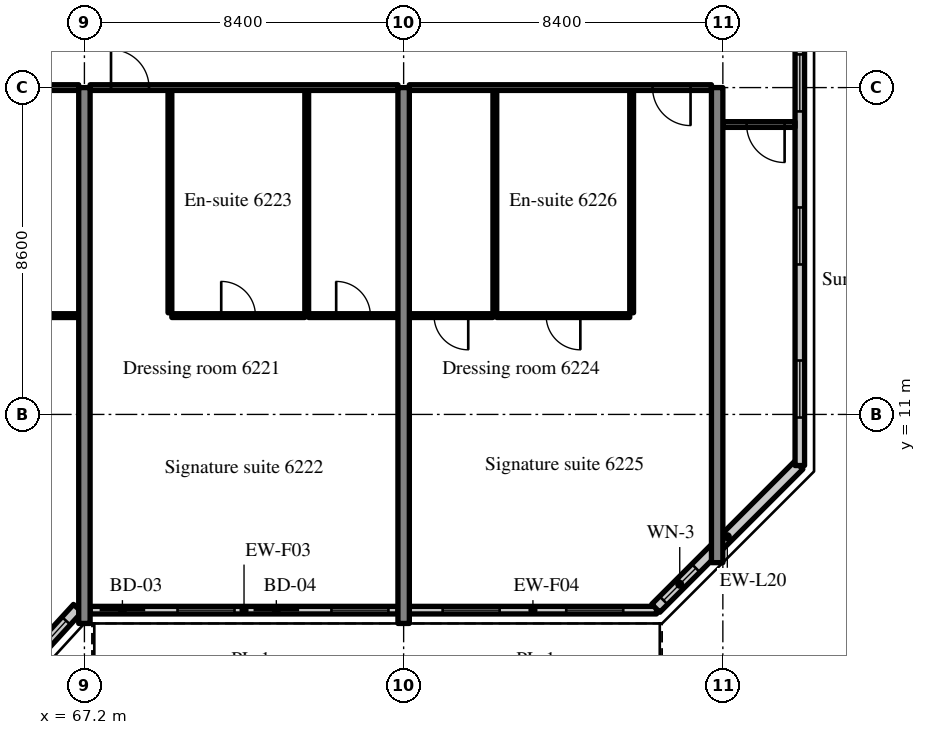
"""IFC4 building model, lengths in metres.
Left out: names, types, materials, properties, quantities, classifications, styles, units other than length and angle.
Written with IfcOpenShell. Run it as: python <this file> out.ifc"""

import sys

from ifc_helpers import new_model, si_unit, direction, frame, frame_2d, origin, place, context, subcontext, project, spatial, rectangle, extrude, source, transform, mapped, element, fill, save


model = new_model("IFC4")
c1 = context("Model", 3, precision=1e-05, world=origin(), true_north=direction((0.0, 1.0)))
c2 = subcontext(c1, "Body", "Model", "MODEL_VIEW")
j1 = project(units=[si_unit("LENGTHUNIT", "METRE"), si_unit("PLANEANGLEUNIT", "RADIAN")], contexts=[c1])
p1 = place(None, origin())
s1 = spatial("IfcSite", under=j1, at=p1, CompositionType="ELEMENT")
p2 = place(p1, origin())
s2 = spatial("IfcBuilding", under=s1, at=p2, CompositionType="ELEMENT")
p3 = place(p2, frame((0.0, 0.0, 256.9)))
s3 = spatial("IfcBuildingStorey", under=s2, at=p3, CompositionType="ELEMENT", Elevation=256.9)
m1 = source(origin(), c2, "Body", "SweptSolid", [
    extrude(rectangle(XDim=14.1, YDim=0.3, at=frame_2d((7.05, 0.0))), origin(), (0.0, 0.0, 1.0), 3.62),
])
for number, where, z_axis, x_axis in (
    (1, (67.2, 5.5, 0.0), (0.0, 0.0, 1.0), (0.0, 1.0, 0.0)),
    (2, (75.6, 5.5, 0.0), (0.0, 0.0, 1.0), (0.0, 1.0, 0.0)),
):
    element("IfcWall", number, at=place(p3, frame(where, z_axis=z_axis, x_axis=x_axis)), inside=s3, PredefinedType="SHEAR", context=c2, shape_type="MappedRepresentation", body=[
        mapped(m1, transform((0.0, 0.0, 0.0), scale=1.0)),
    ])
m2 = source(origin(), c2, "Body", "SweptSolid", [
    extrude(rectangle(XDim=12.5, YDim=0.3, at=frame_2d((6.25, 0.0))), origin(), (0.0, 0.0, 1.0), 3.62),
])
p4 = place(p3, frame((83.85, 7.1, 0.0), z_axis=(0.0, 0.0, 1.0), x_axis=(0.0, 1.0, 0.0)))
e3 = element("IfcWall", 3, at=p4, inside=s3, PredefinedType="SHEAR", context=c2, shape_type="MappedRepresentation", body=[
    mapped(m2, transform((0.0, 0.0, 0.0), scale=1.0)),
])
m3 = source(origin(), c2, "Body", "SweptSolid", [
    extrude(rectangle(XDim=2.398, YDim=0.3, at=frame_2d((1.199, 0.0))), origin(), (0.0, 0.0, 1.0), 3.62),
])
p5 = place(p3, frame((65.404, 4.131, 0.0), z_axis=(0.0, 0.0, 1.0), x_axis=(0.675374189419, 0.737475222815, 0.0)))
e4 = element("IfcWall", 4, at=p5, inside=s3, PredefinedType="SOLIDWALL", context=c2, shape_type="MappedRepresentation", body=[
    mapped(m3, transform((0.0, 0.0, 0.0), scale=1.0)),
])
m4 = source(origin(), c2, "Body", "SweptSolid", [
    extrude(rectangle(XDim=1.5, YDim=2.0, at=frame_2d((0.75, 1.0))), frame((0.0, 0.16, 0.0), z_axis=(0.0, -1.0, 0.0), x_axis=(1.0, 0.0, 0.0)), (0.0, 0.0, 1.0), 0.32),
])
p6 = place(p5, frame((0.449, 0.0, 0.9)))
e5 = element("IfcOpeningElement", 5, at=p6, cuts=e4, PredefinedType="OPENING", context=c2, shape_type="MappedRepresentation", body=[
    mapped(m4, transform((0.0, 0.0, 0.0), scale=1.0)),
])
m5 = source(origin(), c2, "Body", "SweptSolid", [
    extrude(rectangle(XDim=8.1, YDim=0.2, at=frame_2d((4.05, 0.0))), origin(), (0.0, 0.0, 1.0), 3.02),
])
p7 = place(p3, frame((67.35, 5.85, 0.0), z_axis=(0.0, 0.0, 1.0), x_axis=(1.0, 0.0, 0.0)))
e6 = element("IfcWall", 6, at=p7, inside=s3, PredefinedType="SOLIDWALL", context=c2, shape_type="MappedRepresentation", body=[
    mapped(m5, transform((0.0, 0.0, 0.0), scale=1.0)),
])
m6 = source(origin(), c2, "Body", "SweptSolid", [
    extrude(rectangle(XDim=1.2, YDim=2.4, at=frame_2d((0.6, 1.2))), frame((0.0, 0.11, 0.0), z_axis=(0.0, -1.0, 0.0), x_axis=(1.0, 0.0, 0.0)), (0.0, 0.0, 1.0), 0.22),
])
p8 = place(p7, frame((0.25, 0.0, 0.0)))
e7 = element("IfcOpeningElement", 7, at=p8, cuts=e6, PredefinedType="OPENING", context=c2, shape_type="MappedRepresentation", body=[
    mapped(m6, transform((0.0, 0.0, 0.0), scale=1.0)),
])
m7 = source(origin(), c2, "Body", "SweptSolid", [
    extrude(rectangle(XDim=1.5, YDim=1.5, at=frame_2d((0.75, 0.75))), frame((0.0, 0.11, 0.0), z_axis=(0.0, -1.0, 0.0), x_axis=(1.0, 0.0, 0.0)), (0.0, 0.0, 1.0), 0.22),
])
p9 = place(p7, frame((2.3, 0.0, 0.9)))
e8 = element("IfcOpeningElement", 8, at=p9, cuts=e6, PredefinedType="OPENING", context=c2, shape_type="MappedRepresentation", body=[
    mapped(m7, transform((0.0, 0.0, 0.0), scale=1.0)),
])
p10 = place(p7, frame((4.3, 0.0, 0.0)))
e9 = element("IfcOpeningElement", 9, at=p10, cuts=e6, PredefinedType="OPENING", context=c2, shape_type="MappedRepresentation", body=[
    mapped(m6, transform((0.0, 0.0, 0.0), scale=1.0)),
])
p11 = place(p7, frame((6.35, 0.0, 0.9)))
e10 = element("IfcOpeningElement", 10, at=p11, cuts=e6, PredefinedType="OPENING", context=c2, shape_type="MappedRepresentation", body=[
    mapped(m7, transform((0.0, 0.0, 0.0), scale=1.0)),
])
m8 = source(origin(), c2, "Body", "SweptSolid", [
    extrude(rectangle(XDim=6.505, YDim=0.2, at=frame_2d((3.252, 0.0))), origin(), (0.0, 0.0, 1.0), 3.02),
])
p12 = place(p3, frame((75.75, 5.85, 0.0), z_axis=(0.0, 0.0, 1.0), x_axis=(1.0, 0.0, 0.0)))
e11 = element("IfcWall", 11, at=p12, inside=s3, PredefinedType="SOLIDWALL", context=c2, shape_type="MappedRepresentation", body=[
    mapped(m8, transform((0.0, 0.0, 0.0), scale=1.0)),
])
p13 = place(p12, frame((0.876, 0.0, 0.9)))
e12 = element("IfcOpeningElement", 12, at=p13, cuts=e11, PredefinedType="OPENING", context=c2, shape_type="MappedRepresentation", body=[
    mapped(m7, transform((0.0, 0.0, 0.0), scale=1.0)),
])
p14 = place(p12, frame((4.129, 0.0, 0.9)))
e13 = element("IfcOpeningElement", 13, at=p14, cuts=e11, PredefinedType="OPENING", context=c2, shape_type="MappedRepresentation", body=[
    mapped(m7, transform((0.0, 0.0, 0.0), scale=1.0)),
])
m9 = source(origin(), c2, "Body", "SweptSolid", [
    extrude(rectangle(XDim=5.326, YDim=0.3, at=frame_2d((2.663, 0.0))), origin(), (0.0, 0.0, 1.0), 3.62),
])
p15 = place(p3, frame((82.234, 5.9, 0.0), z_axis=(0.0, 0.0, 1.0), x_axis=(0.707083859269, 0.707129702361, 0.0)))
e14 = element("IfcWall", 14, at=p15, inside=s3, PredefinedType="SOLIDWALL", context=c2, shape_type="MappedRepresentation", body=[
    mapped(m9, transform((0.0, 0.0, 0.0), scale=1.0)),
])
m10 = source(origin(), c2, "Body", "SweptSolid", [
    extrude(rectangle(XDim=1.2, YDim=1.5, at=frame_2d((0.6, 0.75))), frame((0.0, 0.16, 0.0), z_axis=(0.0, -1.0, 0.0), x_axis=(1.0, 0.0, 0.0)), (0.0, 0.0, 1.0), 0.32),
])
p16 = place(p15, frame((0.292, 0.0, 0.9)))
e15 = element("IfcOpeningElement", 15, at=p16, cuts=e14, PredefinedType="OPENING", context=c2, shape_type="MappedRepresentation", body=[
    mapped(m10, transform((0.0, 0.0, 0.0), scale=1.0)),
])
m11 = source(origin(), c2, "Body", "SweptSolid", [
    extrude(rectangle(XDim=28.189, YDim=0.25, at=frame_2d((14.095, 0.0))), origin(), (0.0, 0.0, 1.0), 3.62),
])
p17 = place(p3, frame((86.025, 9.655, 0.0), z_axis=(0.0, 0.0, 1.0), x_axis=(0.0, 1.0, 0.0)))
e16 = element("IfcWall", 16, at=p17, inside=s3, PredefinedType="SOLIDWALL", context=c2, shape_type="MappedRepresentation", body=[
    mapped(m11, transform((0.0, 0.0, 0.0), scale=1.0)),
])
m12 = source(origin(), c2, "Body", "SweptSolid", [
    extrude(rectangle(XDim=1.5, YDim=1.5, at=frame_2d((0.75, 0.75))), frame((0.0, 0.135, 0.0), z_axis=(0.0, -1.0, 0.0), x_axis=(1.0, 0.0, 0.0)), (0.0, 0.0, 1.0), 0.27),
])
p18 = place(p17, frame((1.263, 0.0, 0.9)))
e17 = element("IfcOpeningElement", 17, at=p18, cuts=e16, PredefinedType="OPENING", context=c2, shape_type="MappedRepresentation", body=[
    mapped(m12, transform((0.0, 0.0, 0.0), scale=1.0)),
])
p19 = place(p17, frame((5.291, 0.0, 0.9)))
e18 = element("IfcOpeningElement", 18, at=p19, cuts=e16, PredefinedType="OPENING", context=c2, shape_type="MappedRepresentation", body=[
    mapped(m12, transform((0.0, 0.0, 0.0), scale=1.0)),
])
p20 = place(p17, frame((9.318, 0.0, 0.9)))
e19 = element("IfcOpeningElement", 19, at=p20, cuts=e16, PredefinedType="OPENING", context=c2, shape_type="MappedRepresentation", body=[
    mapped(m12, transform((0.0, 0.0, 0.0), scale=1.0)),
])
p21 = place(p17, frame((13.345, 0.0, 0.9)))
e20 = element("IfcOpeningElement", 20, at=p21, cuts=e16, PredefinedType="OPENING", context=c2, shape_type="MappedRepresentation", body=[
    mapped(m12, transform((0.0, 0.0, 0.0), scale=1.0)),
])
p22 = place(p17, frame((17.372, 0.0, 0.9)))
e21 = element("IfcOpeningElement", 21, at=p22, cuts=e16, PredefinedType="OPENING", context=c2, shape_type="MappedRepresentation", body=[
    mapped(m12, transform((0.0, 0.0, 0.0), scale=1.0)),
])
p23 = place(p17, frame((21.399, 0.0, 0.9)))
e22 = element("IfcOpeningElement", 22, at=p23, cuts=e16, PredefinedType="OPENING", context=c2, shape_type="MappedRepresentation", body=[
    mapped(m12, transform((0.0, 0.0, 0.0), scale=1.0)),
])
p24 = place(p17, frame((25.426, 0.0, 0.9)))
e23 = element("IfcOpeningElement", 23, at=p24, cuts=e16, PredefinedType="OPENING", context=c2, shape_type="MappedRepresentation", body=[
    mapped(m12, transform((0.0, 0.0, 0.0), scale=1.0)),
])
m13 = source(origin(), c2, "Body", "SweptSolid", [
    extrude(rectangle(XDim=2.35, YDim=0.1, at=frame_2d((1.175, 0.0))), origin(), (0.0, 0.0, 1.0), 3.62),
])
p25 = place(p3, frame((64.7, 13.6, 0.0), z_axis=(0.0, 0.0, 1.0), x_axis=(1.0, 0.0, 0.0)))
e24 = element("IfcWall", 24, at=p25, inside=s3, PredefinedType="PARTITIONING", context=c2, shape_type="MappedRepresentation", body=[
    mapped(m13, transform((0.0, 0.0, 0.0), scale=1.0)),
])
m14 = source(origin(), c2, "Body", "SweptSolid", [
    extrude(rectangle(XDim=0.9, YDim=2.1, at=frame_2d((0.45, 1.05))), frame((0.0, 0.06, 0.0), z_axis=(0.0, -1.0, 0.0), x_axis=(1.0, 0.0, 0.0)), (0.0, 0.0, 1.0), 0.12),
])
p26 = place(p25, frame((0.725, 0.0, 0.0)))
e25 = element("IfcOpeningElement", 25, at=p26, cuts=e24, PredefinedType="OPENING", context=c2, shape_type="MappedRepresentation", body=[
    mapped(m14, transform((0.0, 0.0, 0.0), scale=1.0)),
])
m15 = source(origin(), c2, "Body", "SweptSolid", [
    extrude(rectangle(XDim=8.1, YDim=0.15, at=frame_2d((4.05, 0.0))), origin(), (0.0, 0.0, 1.0), 2.92),
])
p27 = place(p3, frame((58.95, 19.6, 0.0), z_axis=(0.0, 0.0, 1.0), x_axis=(1.0, 0.0, 0.0)))
e26 = element("IfcWall", 26, at=p27, inside=s3, PredefinedType="PARTITIONING", context=c2, shape_type="MappedRepresentation", body=[
    mapped(m15, transform((0.0, 0.0, 0.0), scale=1.0)),
])
m16 = source(origin(), c2, "Body", "SweptSolid", [
    extrude(rectangle(XDim=1.0, YDim=2.1, at=frame_2d((0.5, 1.05))), frame((0.0, 0.085, 0.0), z_axis=(0.0, -1.0, 0.0), x_axis=(1.0, 0.0, 0.0)), (0.0, 0.0, 1.0), 0.17),
])
p28 = place(p27, frame((0.55, 0.0, 0.0)))
e27 = element("IfcOpeningElement", 27, at=p28, cuts=e26, PredefinedType="OPENING", context=c2, shape_type="MappedRepresentation", body=[
    mapped(m16, transform((0.0, 0.0, 0.0), scale=1.0)),
])
m17 = source(origin(), c2, "Body", "SweptSolid", [
    extrude(rectangle(XDim=5.85, YDim=0.1, at=frame_2d((2.925, 0.0))), origin(), (0.0, 0.0, 1.0), 3.62),
])
for number, where, z_axis, x_axis in (
    (28, (69.45, 13.675, 0.0), (0.0, 0.0, 1.0), (0.0, 1.0, 0.0)),
    (29, (73.05, 13.675, 0.0), (0.0, 0.0, 1.0), (0.0, 1.0, 0.0)),
):
    element("IfcWall", number, at=place(p3, frame(where, z_axis=z_axis, x_axis=x_axis)), inside=s3, PredefinedType="PARTITIONING", context=c2, shape_type="MappedRepresentation", body=[
        mapped(m17, transform((0.0, 0.0, 0.0), scale=1.0)),
    ])
m18 = source(origin(), c2, "Body", "SweptSolid", [
    extrude(rectangle(XDim=3.5, YDim=0.1, at=frame_2d((1.75, 0.0))), origin(), (0.0, 0.0, 1.0), 3.62),
])
p29 = place(p3, frame((69.5, 13.6, 0.0), z_axis=(0.0, 0.0, 1.0), x_axis=(1.0, 0.0, 0.0)))
e30 = element("IfcWall", 30, at=p29, inside=s3, PredefinedType="PARTITIONING", context=c2, shape_type="MappedRepresentation", body=[
    mapped(m18, transform((0.0, 0.0, 0.0), scale=1.0)),
])
p30 = place(p29, frame((1.3, 0.0, 0.0)))
e31 = element("IfcOpeningElement", 31, at=p30, cuts=e30, PredefinedType="OPENING", context=c2, shape_type="MappedRepresentation", body=[
    mapped(m14, transform((0.0, 0.0, 0.0), scale=1.0)),
])
m19 = source(origin(), c2, "Body", "SweptSolid", [
    extrude(rectangle(XDim=2.35, YDim=0.1, at=frame_2d((1.175, 0.0))), origin(), (0.0, 0.0, 1.0), 3.62),
])
p31 = place(p3, frame((73.1, 13.6, 0.0), z_axis=(0.0, 0.0, 1.0), x_axis=(1.0, 0.0, 0.0)))
e32 = element("IfcWall", 32, at=p31, inside=s3, PredefinedType="PARTITIONING", context=c2, shape_type="MappedRepresentation", body=[
    mapped(m19, transform((0.0, 0.0, 0.0), scale=1.0)),
])
p32 = place(p31, frame((0.725, 0.0, 0.0)))
e33 = element("IfcOpeningElement", 33, at=p32, cuts=e32, PredefinedType="OPENING", context=c2, shape_type="MappedRepresentation", body=[
    mapped(m14, transform((0.0, 0.0, 0.0), scale=1.0)),
])
m20 = source(origin(), c2, "Body", "SweptSolid", [
    extrude(rectangle(XDim=8.1, YDim=0.15, at=frame_2d((4.05, 0.0))), origin(), (0.0, 0.0, 1.0), 2.92),
])
p33 = place(p3, frame((67.35, 19.6, 0.0), z_axis=(0.0, 0.0, 1.0), x_axis=(1.0, 0.0, 0.0)))
e34 = element("IfcWall", 34, at=p33, inside=s3, PredefinedType="PARTITIONING", context=c2, shape_type="MappedRepresentation", body=[
    mapped(m20, transform((0.0, 0.0, 0.0), scale=1.0)),
])
p34 = place(p33, frame((0.55, 0.0, 0.0)))
e35 = element("IfcOpeningElement", 35, at=p34, cuts=e34, PredefinedType="OPENING", context=c2, shape_type="MappedRepresentation", body=[
    mapped(m16, transform((0.0, 0.0, 0.0), scale=1.0)),
])
for number, where, z_axis, x_axis in (
    (36, (81.6, 13.675, 0.0), (0.0, 0.0, 1.0), (0.0, 1.0, 0.0)),
    (37, (78.0, 13.675, 0.0), (0.0, 0.0, 1.0), (0.0, 1.0, 0.0)),
):
    element("IfcWall", number, at=place(p3, frame(where, z_axis=z_axis, x_axis=x_axis)), inside=s3, PredefinedType="PARTITIONING", context=c2, shape_type="MappedRepresentation", body=[
        mapped(m17, transform((0.0, 0.0, 0.0), scale=1.0)),
    ])
p35 = place(p3, frame((78.05, 13.6, 0.0), z_axis=(0.0, 0.0, 1.0), x_axis=(1.0, 0.0, 0.0)))
e38 = element("IfcWall", 38, at=p35, inside=s3, PredefinedType="PARTITIONING", context=c2, shape_type="MappedRepresentation", body=[
    mapped(m18, transform((0.0, 0.0, 0.0), scale=1.0)),
])
p36 = place(p35, frame((1.3, 0.0, 0.0)))
e39 = element("IfcOpeningElement", 39, at=p36, cuts=e38, PredefinedType="OPENING", context=c2, shape_type="MappedRepresentation", body=[
    mapped(m14, transform((0.0, 0.0, 0.0), scale=1.0)),
])
m21 = source(origin(), c2, "Body", "SweptSolid", [
    extrude(rectangle(XDim=2.2, YDim=0.1, at=frame_2d((1.1, 0.0))), origin(), (0.0, 0.0, 1.0), 3.62),
])
p37 = place(p3, frame((75.75, 13.6, 0.0), z_axis=(0.0, 0.0, 1.0), x_axis=(1.0, 0.0, 0.0)))
e40 = element("IfcWall", 40, at=p37, inside=s3, PredefinedType="PARTITIONING", context=c2, shape_type="MappedRepresentation", body=[
    mapped(m21, transform((0.0, 0.0, 0.0), scale=1.0)),
])
p38 = place(p37, frame((0.65, 0.0, 0.0)))
e41 = element("IfcOpeningElement", 41, at=p38, cuts=e40, PredefinedType="OPENING", context=c2, shape_type="MappedRepresentation", body=[
    mapped(m14, transform((0.0, 0.0, 0.0), scale=1.0)),
])
m22 = source(origin(), c2, "Body", "SweptSolid", [
    extrude(rectangle(XDim=7.95, YDim=0.15, at=frame_2d((3.975, 0.0))), origin(), (0.0, 0.0, 1.0), 2.92),
])
p39 = place(p3, frame((75.75, 19.6, 0.0), z_axis=(0.0, 0.0, 1.0), x_axis=(1.0, 0.0, 0.0)))
e42 = element("IfcWall", 42, at=p39, inside=s3, PredefinedType="PARTITIONING", context=c2, shape_type="MappedRepresentation", body=[
    mapped(m22, transform((0.0, 0.0, 0.0), scale=1.0)),
])
p40 = place(p39, frame((6.4, 0.0, 0.0)))
e43 = element("IfcOpeningElement", 43, at=p40, cuts=e42, PredefinedType="OPENING", context=c2, shape_type="MappedRepresentation", body=[
    mapped(m16, transform((0.0, 0.0, 0.0), scale=1.0)),
])
m23 = source(origin(), c2, "Body", "SweptSolid", [
    extrude(rectangle(XDim=1.9, YDim=0.15, at=frame_2d((0.95, 0.0))), origin(), (0.0, 0.0, 1.0), 2.92),
])
p41 = place(p3, frame((84.0, 18.628, 0.0), z_axis=(0.0, 0.0, 1.0), x_axis=(1.0, 0.0, 0.0)))
e44 = element("IfcWall", 44, at=p41, inside=s3, PredefinedType="PARTITIONING", context=c2, shape_type="MappedRepresentation", body=[
    mapped(m23, transform((0.0, 0.0, 0.0), scale=1.0)),
])
p42 = place(p41, frame((0.625, 0.0, 0.0)))
e45 = element("IfcOpeningElement", 45, at=p42, cuts=e44, PredefinedType="OPENING", context=c2, shape_type="MappedRepresentation", body=[
    mapped(m16, transform((0.0, 0.0, 0.0), scale=1.0)),
])
m24 = source(origin(), c2, "Body", "SweptSolid", [
    extrude(rectangle(XDim=1.5, YDim=2.0, at=frame_2d((0.75, 1.0))), frame((0.0, 0.03, 0.0), z_axis=(0.0, -1.0, 0.0), x_axis=(1.0, 0.0, 0.0)), (0.0, 0.0, 1.0), 0.06),
])
p43 = place(p6, origin())
e46 = element("IfcWindow", 46, at=p43, inside=s3, PartitioningType="SINGLE_PANEL", PredefinedType="WINDOW", context=c2, shape_type="MappedRepresentation", body=[
    mapped(m24, transform((0.0, 0.0, 0.0), scale=1.0)),
])
fill(e5, e46)
m25 = source(origin(), c2, "Body", "SweptSolid", [
    extrude(rectangle(XDim=1.2, YDim=2.4, at=frame_2d((0.6, 1.2))), frame((0.0, 0.025, 0.0), z_axis=(0.0, -1.0, 0.0), x_axis=(1.0, 0.0, 0.0)), (0.0, 0.0, 1.0), 0.05),
])
p44 = place(p8, origin())
e47 = element("IfcDoor", 47, at=p44, inside=s3, OperationType="SLIDING_TO_LEFT", PredefinedType="DOOR", context=c2, shape_type="MappedRepresentation", body=[
    mapped(m25, transform((0.0, 0.0, 0.0), scale=1.0)),
])
fill(e7, e47)
m26 = source(origin(), c2, "Body", "SweptSolid", [
    extrude(rectangle(XDim=1.5, YDim=1.5, at=frame_2d((0.75, 0.75))), frame((0.0, 0.03, 0.0), z_axis=(0.0, -1.0, 0.0), x_axis=(1.0, 0.0, 0.0)), (0.0, 0.0, 1.0), 0.06),
])
p45 = place(p9, origin())
e48 = element("IfcWindow", 48, at=p45, inside=s3, PartitioningType="SINGLE_PANEL", PredefinedType="WINDOW", context=c2, shape_type="MappedRepresentation", body=[
    mapped(m26, transform((0.0, 0.0, 0.0), scale=1.0)),
])
fill(e8, e48)
p46 = place(p10, origin())
e49 = element("IfcDoor", 49, at=p46, inside=s3, OperationType="SLIDING_TO_RIGHT", PredefinedType="DOOR", context=c2, shape_type="MappedRepresentation", body=[
    mapped(m25, transform((0.0, 0.0, 0.0), scale=1.0)),
])
fill(e9, e49)
p47 = place(p11, origin())
e50 = element("IfcWindow", 50, at=p47, inside=s3, PartitioningType="SINGLE_PANEL", PredefinedType="WINDOW", context=c2, shape_type="MappedRepresentation", body=[
    mapped(m26, transform((0.0, 0.0, 0.0), scale=1.0)),
])
fill(e10, e50)
p48 = place(p13, origin())
e51 = element("IfcWindow", 51, at=p48, inside=s3, PartitioningType="SINGLE_PANEL", PredefinedType="WINDOW", context=c2, shape_type="MappedRepresentation", body=[
    mapped(m26, transform((0.0, 0.0, 0.0), scale=1.0)),
])
fill(e12, e51)
p49 = place(p14, origin())
e52 = element("IfcWindow", 52, at=p49, inside=s3, PartitioningType="SINGLE_PANEL", PredefinedType="WINDOW", context=c2, shape_type="MappedRepresentation", body=[
    mapped(m26, transform((0.0, 0.0, 0.0), scale=1.0)),
])
fill(e13, e52)
m27 = source(origin(), c2, "Body", "SweptSolid", [
    extrude(rectangle(XDim=1.2, YDim=1.5, at=frame_2d((0.6, 0.75))), frame((0.0, 0.03, 0.0), z_axis=(0.0, -1.0, 0.0), x_axis=(1.0, 0.0, 0.0)), (0.0, 0.0, 1.0), 0.06),
])
p50 = place(p16, origin())
e53 = element("IfcWindow", 53, at=p50, inside=s3, PartitioningType="SINGLE_PANEL", PredefinedType="WINDOW", context=c2, shape_type="MappedRepresentation", body=[
    mapped(m27, transform((0.0, 0.0, 0.0), scale=1.0)),
])
fill(e15, e53)
p51 = place(p18, origin())
e54 = element("IfcWindow", 54, at=p51, inside=s3, PartitioningType="SINGLE_PANEL", PredefinedType="WINDOW", context=c2, shape_type="MappedRepresentation", body=[
    mapped(m26, transform((0.0, 0.0, 0.0), scale=1.0)),
])
fill(e17, e54)
p52 = place(p19, origin())
e55 = element("IfcWindow", 55, at=p52, inside=s3, PartitioningType="SINGLE_PANEL", PredefinedType="WINDOW", context=c2, shape_type="MappedRepresentation", body=[
    mapped(m26, transform((0.0, 0.0, 0.0), scale=1.0)),
])
fill(e18, e55)
p53 = place(p20, origin())
e56 = element("IfcWindow", 56, at=p53, inside=s3, PartitioningType="SINGLE_PANEL", PredefinedType="WINDOW", context=c2, shape_type="MappedRepresentation", body=[
    mapped(m26, transform((0.0, 0.0, 0.0), scale=1.0)),
])
fill(e19, e56)
m28 = source(origin(), c2, "Body", "SweptSolid", [
    extrude(rectangle(XDim=0.9, YDim=2.1, at=frame_2d((0.45, 1.05))), frame((0.0, 0.025, 0.0), z_axis=(0.0, -1.0, 0.0), x_axis=(1.0, 0.0, 0.0)), (0.0, 0.0, 1.0), 0.05),
])
p54 = place(p30, origin())
e57 = element("IfcDoor", 57, at=p54, inside=s3, OperationType="SINGLE_SWING_LEFT", PredefinedType="DOOR", context=c2, shape_type="MappedRepresentation", body=[
    mapped(m28, transform((0.0, 0.0, 0.0), scale=1.0)),
])
fill(e31, e57)
p55 = place(p32, origin())
e58 = element("IfcDoor", 58, at=p55, inside=s3, OperationType="SINGLE_SWING_LEFT", PredefinedType="DOOR", context=c2, shape_type="MappedRepresentation", body=[
    mapped(m28, transform((0.0, 0.0, 0.0), scale=1.0)),
])
fill(e33, e58)
m29 = source(origin(), c2, "Body", "SweptSolid", [
    extrude(rectangle(XDim=1.0, YDim=2.1, at=frame_2d((0.5, 1.05))), frame((0.0, 0.025, 0.0), z_axis=(0.0, -1.0, 0.0), x_axis=(1.0, 0.0, 0.0)), (0.0, 0.0, 1.0), 0.05),
])
p56 = place(p34, origin())
e59 = element("IfcDoor", 59, at=p56, inside=s3, OperationType="SINGLE_SWING_LEFT", PredefinedType="DOOR", context=c2, shape_type="MappedRepresentation", body=[
    mapped(m29, transform((0.0, 0.0, 0.0), scale=1.0)),
])
fill(e35, e59)
p57 = place(p36, origin())
e60 = element("IfcDoor", 60, at=p57, inside=s3, OperationType="SINGLE_SWING_RIGHT", PredefinedType="DOOR", context=c2, shape_type="MappedRepresentation", body=[
    mapped(m28, transform((0.0, 0.0, 0.0), scale=1.0)),
])
fill(e39, e60)
p58 = place(p38, origin())
e61 = element("IfcDoor", 61, at=p58, inside=s3, OperationType="SINGLE_SWING_RIGHT", PredefinedType="DOOR", context=c2, shape_type="MappedRepresentation", body=[
    mapped(m28, transform((0.0, 0.0, 0.0), scale=1.0)),
])
fill(e41, e61)
p59 = place(p40, origin())
e62 = element("IfcDoor", 62, at=p59, inside=s3, OperationType="SINGLE_SWING_RIGHT", PredefinedType="DOOR", context=c2, shape_type="MappedRepresentation", body=[
    mapped(m29, transform((0.0, 0.0, 0.0), scale=1.0)),
])
fill(e43, e62)
p60 = place(p42, origin())
e63 = element("IfcDoor", 63, at=p60, inside=s3, OperationType="SINGLE_SWING_RIGHT", PredefinedType="DOOR", context=c2, shape_type="MappedRepresentation", body=[
    mapped(m29, transform((0.0, 0.0, 0.0), scale=1.0)),
])
fill(e45, e63)
save(model, sys.argv[1])
